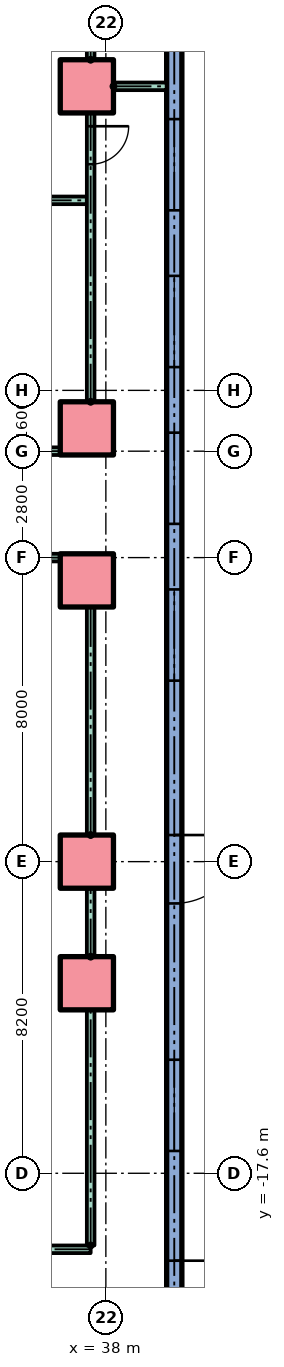
"""IFC4 building model, lengths in metres.
Left out: names, types, materials, properties, quantities, classifications, styles, units other than length and angle.
Written with IfcOpenShell. Run it as: python <this file> out.ifc"""

import sys

from ifc_helpers import new_model, si_unit, direction, frame, frame_2d, origin, origin_2d, place, context, subcontext, project, spatial, rectangle, hollow_rectangle, extrude, element, fill, save


model = new_model("IFC4")
c1 = context("Model", 3, precision=1e-05, world=origin(), true_north=direction((0.0, 1.0)))
c2 = subcontext(c1, "Body", "Model", "MODEL_VIEW")
j1 = project(units=[si_unit("LENGTHUNIT", "METRE"), si_unit("PLANEANGLEUNIT", "RADIAN")], contexts=[c1])
p1 = place(None, origin())
s1 = spatial("IfcSite", under=j1, at=p1, CompositionType="ELEMENT")
p2 = place(p1, origin())
s2 = spatial("IfcBuilding", under=s1, at=p2, CompositionType="ELEMENT")
p3 = place(p2, origin())
s3 = spatial("IfcBuildingStorey", under=s2, at=p3, CompositionType="ELEMENT", Elevation=0.0)
for number, where in (
    (1, (37.5, -12.6, 0.0)),
    (2, (37.5, -9.4, 0.0)),
    (3, (37.5, -2.0, 0.0)),
    (4, (37.5, 2.0, 0.0)),
    (5, (37.5, 11.0, 0.0)),
):
    element("IfcColumn", number, at=place(p3, frame(where)), inside=s3, PredefinedType="COLUMN", context=c2, shape_type="SweptSolid", body=[
        extrude(hollow_rectangle(XDim=1.4, YDim=1.4, WallThickness=0.08, at=origin_2d()), origin(), (0.0, 0.0, 1.0), 6.0),
    ])
p4 = place(p3, frame((39.8, -50.0, 0.0), z_axis=(0.0, 0.0, 1.0), x_axis=(0.0, 1.0, 0.0)))
e6 = element("IfcWall", 6, at=p4, inside=s3, PredefinedType="STANDARD", context=c2, shape_type="SweptSolid", body=[
    extrude(rectangle(XDim=70.0, YDim=0.4, at=frame_2d((35.0, 0.0))), origin(), (0.0, 0.0, 1.0), 5.7),
])
p5 = place(p4, frame((17.933, 0.0, 0.0)))
e7 = element("IfcOpeningElement", 7, at=p5, cuts=e6, PredefinedType="OPENING", context=c2, shape_type="SweptSolid", body=[
    extrude(rectangle(XDim=1.8, YDim=2.4, at=frame_2d((0.9, 1.2))), frame((0.0, 0.21, 0.0), z_axis=(0.0, -1.0, 0.0), x_axis=(1.0, 0.0, 0.0)), (0.0, 0.0, 1.0), 0.42),
])
p6 = place(p4, frame((0.75, 0.0, 0.9)))
e8 = element("IfcOpeningElement", 8, at=p6, cuts=e6, PredefinedType="OPENING", context=c2, shape_type="SweptSolid", body=[
    extrude(rectangle(XDim=2.4, YDim=2.4, at=frame_2d((1.2, 1.2))), frame((0.0, 0.21, 0.0), z_axis=(0.0, -1.0, 0.0), x_axis=(1.0, 0.0, 0.0)), (0.0, 0.0, 1.0), 0.42),
])
p7 = place(p4, frame((21.3, 0.0, 0.9)))
e9 = element("IfcOpeningElement", 9, at=p7, cuts=e6, PredefinedType="OPENING", context=c2, shape_type="SweptSolid", body=[
    extrude(rectangle(XDim=2.4, YDim=2.4, at=frame_2d((1.2, 1.2))), frame((0.0, 0.21, 0.0), z_axis=(0.0, -1.0, 0.0), x_axis=(1.0, 0.0, 0.0)), (0.0, 0.0, 1.0), 0.42),
])
p8 = place(p4, frame((24.967, 0.0, 0.9)))
e10 = element("IfcOpeningElement", 10, at=p8, cuts=e6, PredefinedType="OPENING", context=c2, shape_type="SweptSolid", body=[
    extrude(rectangle(XDim=2.4, YDim=2.4, at=frame_2d((1.2, 1.2))), frame((0.0, 0.21, 0.0), z_axis=(0.0, -1.0, 0.0), x_axis=(1.0, 0.0, 0.0)), (0.0, 0.0, 1.0), 0.42),
])
p9 = place(p4, frame((32.988, 0.0, 0.9)))
e11 = element("IfcOpeningElement", 11, at=p9, cuts=e6, PredefinedType="OPENING", context=c2, shape_type="SweptSolid", body=[
    extrude(rectangle(XDim=2.4, YDim=2.4, at=frame_2d((1.2, 1.2))), frame((0.0, 0.21, 0.0), z_axis=(0.0, -1.0, 0.0), x_axis=(1.0, 0.0, 0.0)), (0.0, 0.0, 1.0), 0.42),
])
p10 = place(p4, frame((45.363, 0.0, 0.9)))
e12 = element("IfcOpeningElement", 12, at=p10, cuts=e6, PredefinedType="OPENING", context=c2, shape_type="SweptSolid", body=[
    extrude(rectangle(XDim=2.4, YDim=2.4, at=frame_2d((1.2, 1.2))), frame((0.0, 0.21, 0.0), z_axis=(0.0, -1.0, 0.0), x_axis=(1.0, 0.0, 0.0)), (0.0, 0.0, 1.0), 0.42),
])
p11 = place(p4, frame((49.488, 0.0, 0.9)))
e13 = element("IfcOpeningElement", 13, at=p11, cuts=e6, PredefinedType="OPENING", context=c2, shape_type="SweptSolid", body=[
    extrude(rectangle(XDim=2.4, YDim=2.4, at=frame_2d((1.2, 1.2))), frame((0.0, 0.21, 0.0), z_axis=(0.0, -1.0, 0.0), x_axis=(1.0, 0.0, 0.0)), (0.0, 0.0, 1.0), 0.42),
])
p12 = place(p4, frame((53.613, 0.0, 0.9)))
e14 = element("IfcOpeningElement", 14, at=p12, cuts=e6, PredefinedType="OPENING", context=c2, shape_type="SweptSolid", body=[
    extrude(rectangle(XDim=2.4, YDim=2.4, at=frame_2d((1.2, 1.2))), frame((0.0, 0.21, 0.0), z_axis=(0.0, -1.0, 0.0), x_axis=(1.0, 0.0, 0.0)), (0.0, 0.0, 1.0), 0.42),
])
p13 = place(p4, frame((57.738, 0.0, 0.9)))
e15 = element("IfcOpeningElement", 15, at=p13, cuts=e6, PredefinedType="OPENING", context=c2, shape_type="SweptSolid", body=[
    extrude(rectangle(XDim=2.4, YDim=2.4, at=frame_2d((1.2, 1.2))), frame((0.0, 0.21, 0.0), z_axis=(0.0, -1.0, 0.0), x_axis=(1.0, 0.0, 0.0)), (0.0, 0.0, 1.0), 0.42),
])
p14 = place(p4, frame((62.05, 0.0, 0.9)))
e16 = element("IfcOpeningElement", 16, at=p14, cuts=e6, PredefinedType="OPENING", context=c2, shape_type="SweptSolid", body=[
    extrude(rectangle(XDim=2.4, YDim=2.4, at=frame_2d((1.2, 1.2))), frame((0.0, 0.21, 0.0), z_axis=(0.0, -1.0, 0.0), x_axis=(1.0, 0.0, 0.0)), (0.0, 0.0, 1.0), 0.42),
])
p15 = place(p4, frame((66.55, 0.0, 0.9)))
e17 = element("IfcOpeningElement", 17, at=p15, cuts=e6, PredefinedType="OPENING", context=c2, shape_type="SweptSolid", body=[
    extrude(rectangle(XDim=2.4, YDim=2.4, at=frame_2d((1.2, 1.2))), frame((0.0, 0.21, 0.0), z_axis=(0.0, -1.0, 0.0), x_axis=(1.0, 0.0, 0.0)), (0.0, 0.0, 1.0), 0.42),
])
p16 = place(p4, frame((39.5, 0.0, 0.0)))
e18 = element("IfcOpeningElement", 18, at=p16, cuts=e6, PredefinedType="OPENING", context=c2, shape_type="SweptSolid", body=[
    extrude(rectangle(XDim=1.8, YDim=2.1, at=frame_2d((0.9, 1.05))), frame((0.0, 0.21, 0.0), z_axis=(0.0, -1.0, 0.0), x_axis=(1.0, 0.0, 0.0)), (0.0, 0.0, 1.0), 0.42),
])
p17 = place(p4, frame((28.3, 0.0, 0.0)))
e19 = element("IfcOpeningElement", 19, at=p17, cuts=e6, PredefinedType="OPENING", context=c2, shape_type="SweptSolid", body=[
    extrude(rectangle(XDim=1.8, YDim=2.1, at=frame_2d((0.9, 1.05))), frame((0.0, 0.21, 0.0), z_axis=(0.0, -1.0, 0.0), x_axis=(1.0, 0.0, 0.0)), (0.0, 0.0, 1.0), 0.42),
])
p18 = place(p3, frame((-37.6, -19.6, 0.0)))
e20 = element("IfcWall", 20, at=p18, inside=s3, PredefinedType="PARTITIONING", context=c2, shape_type="SweptSolid", body=[
    extrude(rectangle(XDim=75.2, YDim=0.2, at=frame_2d((37.6, 0.0))), origin(), (0.0, 0.0, 1.0), 5.7),
])
p19 = place(p18, frame((26.204, 0.0, 0.0)))
e21 = element("IfcOpeningElement", 21, at=p19, cuts=e20, PredefinedType="OPENING", context=c2, shape_type="SweptSolid", body=[
    extrude(rectangle(XDim=1.8, YDim=2.1, at=frame_2d((0.9, 1.05))), frame((0.0, 0.11, 0.0), z_axis=(0.0, -1.0, 0.0), x_axis=(1.0, 0.0, 0.0)), (0.0, 0.0, 1.0), 0.22),
])
p20 = place(p18, frame((36.7, 0.0, 0.0)))
e22 = element("IfcOpeningElement", 22, at=p20, cuts=e20, PredefinedType="OPENING", context=c2, shape_type="SweptSolid", body=[
    extrude(rectangle(XDim=1.8, YDim=2.1, at=frame_2d((0.9, 1.05))), frame((0.0, 0.11, 0.0), z_axis=(0.0, -1.0, 0.0), x_axis=(1.0, 0.0, 0.0)), (0.0, 0.0, 1.0), 0.22),
])
p21 = place(p18, frame((47.196, 0.0, 0.0)))
e23 = element("IfcOpeningElement", 23, at=p21, cuts=e20, PredefinedType="OPENING", context=c2, shape_type="SweptSolid", body=[
    extrude(rectangle(XDim=1.8, YDim=2.1, at=frame_2d((0.9, 1.05))), frame((0.0, 0.11, 0.0), z_axis=(0.0, -1.0, 0.0), x_axis=(1.0, 0.0, 0.0)), (0.0, 0.0, 1.0), 0.22),
])
for number, where in (
    (24, (34.55, -1.4, 0.0)),
    (25, (34.55, 1.4, 0.0)),
):
    element("IfcWall", number, at=place(p3, frame(where)), inside=s3, PredefinedType="PARTITIONING", context=c2, shape_type="SweptSolid", body=[
        extrude(rectangle(XDim=2.25, YDim=0.2, at=frame_2d((1.125, 0.0))), origin(), (0.0, 0.0, 1.0), 5.7),
    ])
p22 = place(p3, frame((16.3, 8.0, 0.0)))
e26 = element("IfcWall", 26, at=p22, inside=s3, PredefinedType="PARTITIONING", context=c2, shape_type="SweptSolid", body=[
    extrude(rectangle(XDim=21.2, YDim=0.2, at=frame_2d((10.6, 0.0))), origin(), (0.0, 0.0, 1.0), 5.7),
])
p23 = place(p3, frame((38.2, 11.0, 0.0)))
e27 = element("IfcWall", 27, at=p23, inside=s3, PredefinedType="PARTITIONING", context=c2, shape_type="SweptSolid", body=[
    extrude(rectangle(XDim=1.4, YDim=0.2, at=frame_2d((0.7, 0.0))), origin(), (0.0, 0.0, 1.0), 5.7),
])
p24 = place(p3, frame((37.6, -19.5, 0.0), z_axis=(0.0, 0.0, 1.0), x_axis=(0.0, 1.0, 0.0)))
e28 = element("IfcWall", 28, at=p24, inside=s3, PredefinedType="PARTITIONING", context=c2, shape_type="SweptSolid", body=[
    extrude(rectangle(XDim=6.2, YDim=0.2, at=frame_2d((3.1, 0.0))), origin(), (0.0, 0.0, 1.0), 5.7),
])
p25 = place(p3, frame((37.6, -11.9, 0.0), z_axis=(0.0, 0.0, 1.0), x_axis=(0.0, 1.0, 0.0)))
e29 = element("IfcWall", 29, at=p25, inside=s3, PredefinedType="PARTITIONING", context=c2, shape_type="SweptSolid", body=[
    extrude(rectangle(XDim=1.8, YDim=0.2, at=frame_2d((0.9, 0.0))), origin(), (0.0, 0.0, 1.0), 5.7),
])
p26 = place(p3, frame((37.6, -8.7, 0.0), z_axis=(0.0, 0.0, 1.0), x_axis=(0.0, 1.0, 0.0)))
e30 = element("IfcWall", 30, at=p26, inside=s3, PredefinedType="PARTITIONING", context=c2, shape_type="SweptSolid", body=[
    extrude(rectangle(XDim=6.0, YDim=0.2, at=frame_2d((3.0, 0.0))), origin(), (0.0, 0.0, 1.0), 5.7),
])
p27 = place(p3, frame((37.6, 2.7, 0.0), z_axis=(0.0, 0.0, 1.0), x_axis=(0.0, 1.0, 0.0)))
e31 = element("IfcWall", 31, at=p27, inside=s3, PredefinedType="PARTITIONING", context=c2, shape_type="SweptSolid", body=[
    extrude(rectangle(XDim=7.6, YDim=0.2, at=frame_2d((3.8, 0.0))), origin(), (0.0, 0.0, 1.0), 5.7),
])
p28 = place(p27, frame((6.25, 0.0, 0.0)))
e32 = element("IfcOpeningElement", 32, at=p28, cuts=e31, PredefinedType="OPENING", context=c2, shape_type="SweptSolid", body=[
    extrude(rectangle(XDim=1.0, YDim=2.1, at=frame_2d((0.5, 1.05))), frame((0.0, 0.11, 0.0), z_axis=(0.0, -1.0, 0.0), x_axis=(1.0, 0.0, 0.0)), (0.0, 0.0, 1.0), 0.22),
])
p29 = place(p3, frame((37.6, 11.7, 0.0), z_axis=(0.0, 0.0, 1.0), x_axis=(0.0, 1.0, 0.0)))
e33 = element("IfcWall", 33, at=p29, inside=s3, PredefinedType="PARTITIONING", context=c2, shape_type="SweptSolid", body=[
    extrude(rectangle(XDim=2.6, YDim=0.2, at=frame_2d((1.3, 0.0))), origin(), (0.0, 0.0, 1.0), 5.7),
])
p30 = place(p9, origin())
e34 = element("IfcWindow", 34, at=p30, inside=s3, PartitioningType="SINGLE_PANEL", PredefinedType="WINDOW", context=c2, shape_type="SweptSolid", body=[
    extrude(rectangle(XDim=2.4, YDim=2.4, at=frame_2d((1.2, 1.2))), frame((0.0, 0.03, 0.0), z_axis=(0.0, -1.0, 0.0), x_axis=(1.0, 0.0, 0.0)), (0.0, 0.0, 1.0), 0.06),
])
fill(e11, e34)
p31 = place(p10, origin())
e35 = element("IfcWindow", 35, at=p31, inside=s3, PartitioningType="SINGLE_PANEL", PredefinedType="WINDOW", context=c2, shape_type="SweptSolid", body=[
    extrude(rectangle(XDim=2.4, YDim=2.4, at=frame_2d((1.2, 1.2))), frame((0.0, 0.03, 0.0), z_axis=(0.0, -1.0, 0.0), x_axis=(1.0, 0.0, 0.0)), (0.0, 0.0, 1.0), 0.06),
])
fill(e12, e35)
p32 = place(p11, origin())
e36 = element("IfcWindow", 36, at=p32, inside=s3, PartitioningType="SINGLE_PANEL", PredefinedType="WINDOW", context=c2, shape_type="SweptSolid", body=[
    extrude(rectangle(XDim=2.4, YDim=2.4, at=frame_2d((1.2, 1.2))), frame((0.0, 0.03, 0.0), z_axis=(0.0, -1.0, 0.0), x_axis=(1.0, 0.0, 0.0)), (0.0, 0.0, 1.0), 0.06),
])
fill(e13, e36)
p33 = place(p12, origin())
e37 = element("IfcWindow", 37, at=p33, inside=s3, PartitioningType="SINGLE_PANEL", PredefinedType="WINDOW", context=c2, shape_type="SweptSolid", body=[
    extrude(rectangle(XDim=2.4, YDim=2.4, at=frame_2d((1.2, 1.2))), frame((0.0, 0.03, 0.0), z_axis=(0.0, -1.0, 0.0), x_axis=(1.0, 0.0, 0.0)), (0.0, 0.0, 1.0), 0.06),
])
fill(e14, e37)
p34 = place(p13, origin())
e38 = element("IfcWindow", 38, at=p34, inside=s3, PartitioningType="SINGLE_PANEL", PredefinedType="WINDOW", context=c2, shape_type="SweptSolid", body=[
    extrude(rectangle(XDim=2.4, YDim=2.4, at=frame_2d((1.2, 1.2))), frame((0.0, 0.03, 0.0), z_axis=(0.0, -1.0, 0.0), x_axis=(1.0, 0.0, 0.0)), (0.0, 0.0, 1.0), 0.06),
])
fill(e15, e38)
p35 = place(p28, frame((1.0, 0.0, 0.0), z_axis=(0.0, 0.0, 1.0), x_axis=(-1.0, 0.0, 0.0)))
e39 = element("IfcDoor", 39, at=p35, inside=s3, OperationType="SINGLE_SWING_RIGHT", PredefinedType="DOOR", context=c2, shape_type="SweptSolid", body=[
    extrude(rectangle(XDim=1.0, YDim=2.1, at=frame_2d((0.5, 1.05))), frame((0.0, 0.025, 0.0), z_axis=(0.0, -1.0, 0.0), x_axis=(1.0, 0.0, 0.0)), (0.0, 0.0, 1.0), 0.05),
])
fill(e32, e39)
p36 = place(p16, frame((1.8, 0.0, 0.0), z_axis=(0.0, 0.0, 1.0), x_axis=(-1.0, 0.0, 0.0)))
e40 = element("IfcDoor", 40, at=p36, inside=s3, OperationType="DOUBLE_DOOR_SINGLE_SWING", PredefinedType="DOOR", context=c2, shape_type="SweptSolid", body=[
    extrude(rectangle(XDim=1.8, YDim=2.1, at=frame_2d((0.9, 1.05))), frame((0.0, 0.025, 0.0), z_axis=(0.0, -1.0, 0.0), x_axis=(1.0, 0.0, 0.0)), (0.0, 0.0, 1.0), 0.05),
])
fill(e18, e40)
p37 = place(p17, frame((1.8, 0.0, 0.0), z_axis=(0.0, 0.0, 1.0), x_axis=(-1.0, 0.0, 0.0)))
e41 = element("IfcDoor", 41, at=p37, inside=s3, OperationType="DOUBLE_DOOR_SINGLE_SWING", PredefinedType="DOOR", context=c2, shape_type="SweptSolid", body=[
    extrude(rectangle(XDim=1.8, YDim=2.1, at=frame_2d((0.9, 1.05))), frame((0.0, 0.025, 0.0), z_axis=(0.0, -1.0, 0.0), x_axis=(1.0, 0.0, 0.0)), (0.0, 0.0, 1.0), 0.05),
])
fill(e19, e41)
save(model, sys.argv[1])
